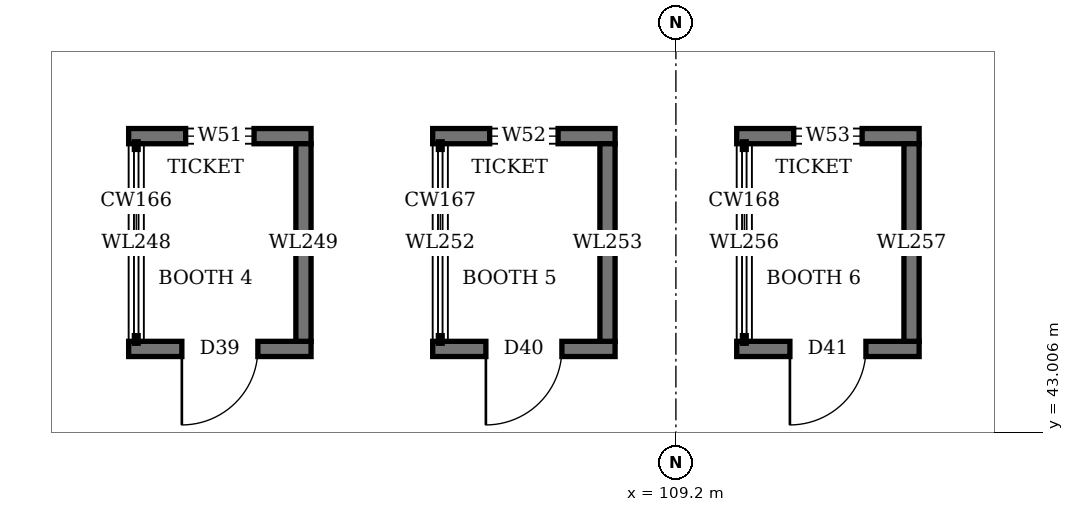
"""IFC4 building model, lengths in metres.
Left out: names, types, materials, properties, quantities, classifications, styles, units other than length and angle.
Written with IfcOpenShell. Run it as: python <this file> out.ifc"""

import sys

from ifc_helpers import new_model, si_unit, direction, frame, frame_2d, origin, place, context, subcontext, project, spatial, rectangle, extrude, element, fill, save


model = new_model("IFC4")
c1 = context("Model", 3, precision=1e-05, world=origin(), true_north=direction((0.0, 1.0)))
c2 = subcontext(c1, "Body", "Model", "MODEL_VIEW")
j1 = project(units=[si_unit("LENGTHUNIT", "METRE"), si_unit("PLANEANGLEUNIT", "RADIAN")], contexts=[c1])
p1 = place(None, origin())
s1 = spatial("IfcSite", under=j1, at=p1, CompositionType="ELEMENT")
p2 = place(p1, origin())
s2 = spatial("IfcBuilding", under=s1, at=p2, CompositionType="ELEMENT")
p3 = place(p2, origin())
s3 = spatial("IfcBuildingStorey", under=s2, at=p3, CompositionType="ELEMENT", Elevation=0.0)
p4 = place(p3, frame((102.0, 44.1, 0.0), z_axis=(0.0, 0.0, 1.0), x_axis=(1.0, 0.0, 0.0)))
e1 = element("IfcWall", 1, at=p4, inside=s3, PredefinedType="SOLIDWALL", context=c2, shape_type="SweptSolid", body=[
    extrude(rectangle(XDim=2.4, YDim=0.2, at=frame_2d((1.2, 0.0))), origin(), (0.0, 0.0, 1.0), 2.65),
])
p5 = place(p4, frame((0.7, 0.0, 0.0)))
e2 = element("IfcOpeningElement", 2, at=p5, cuts=e1, PredefinedType="OPENING", context=c2, shape_type="SweptSolid", body=[
    extrude(rectangle(XDim=1.0, YDim=2.1, at=frame_2d((0.5, 1.05))), frame((0.0, 0.11, 0.0), z_axis=(0.0, -1.0, 0.0), x_axis=(1.0, 0.0, 0.0)), (0.0, 0.0, 1.0), 0.22),
])
p6 = place(p3, frame((102.0, 46.9, 0.0), z_axis=(0.0, 0.0, 1.0), x_axis=(1.0, 0.0, 0.0)))
e3 = element("IfcWall", 3, at=p6, inside=s3, PredefinedType="SOLIDWALL", context=c2, shape_type="SweptSolid", body=[
    extrude(rectangle(XDim=2.4, YDim=0.2, at=frame_2d((1.2, 0.0))), origin(), (0.0, 0.0, 1.0), 2.65),
])
p7 = place(p6, frame((0.75, 0.0, 0.9)))
e4 = element("IfcOpeningElement", 4, at=p7, cuts=e3, PredefinedType="OPENING", context=c2, shape_type="SweptSolid", body=[
    extrude(rectangle(XDim=0.9, YDim=1.2, at=frame_2d((0.45, 0.6))), frame((0.0, 0.11, 0.0), z_axis=(0.0, -1.0, 0.0), x_axis=(1.0, 0.0, 0.0)), (0.0, 0.0, 1.0), 0.22),
])
p8 = place(p3, frame((102.1, 44.2, 0.0), z_axis=(0.0, 0.0, 1.0), x_axis=(0.0, 1.0, 0.0)))
e5 = element("IfcWall", 5, at=p8, inside=s3, PredefinedType="SOLIDWALL", context=c2, shape_type="SweptSolid", body=[
    extrude(rectangle(XDim=2.6, YDim=0.2, at=frame_2d((1.3, 0.0))), origin(), (0.0, 0.0, 1.0), 1.0),
])
p9 = place(p3, frame((104.3, 44.2, 0.0), z_axis=(0.0, 0.0, 1.0), x_axis=(0.0, 1.0, 0.0)))
e6 = element("IfcWall", 6, at=p9, inside=s3, PredefinedType="SOLIDWALL", context=c2, shape_type="SweptSolid", body=[
    extrude(rectangle(XDim=2.6, YDim=0.2, at=frame_2d((1.3, 0.0))), origin(), (0.0, 0.0, 1.0), 2.65),
])
p10 = place(p3, frame((106.0, 44.1, 0.0), z_axis=(0.0, 0.0, 1.0), x_axis=(1.0, 0.0, 0.0)))
e7 = element("IfcWall", 7, at=p10, inside=s3, PredefinedType="SOLIDWALL", context=c2, shape_type="SweptSolid", body=[
    extrude(rectangle(XDim=2.4, YDim=0.2, at=frame_2d((1.2, 0.0))), origin(), (0.0, 0.0, 1.0), 2.65),
])
p11 = place(p10, frame((0.7, 0.0, 0.0)))
e8 = element("IfcOpeningElement", 8, at=p11, cuts=e7, PredefinedType="OPENING", context=c2, shape_type="SweptSolid", body=[
    extrude(rectangle(XDim=1.0, YDim=2.1, at=frame_2d((0.5, 1.05))), frame((0.0, 0.11, 0.0), z_axis=(0.0, -1.0, 0.0), x_axis=(1.0, 0.0, 0.0)), (0.0, 0.0, 1.0), 0.22),
])
p12 = place(p3, frame((106.0, 46.9, 0.0), z_axis=(0.0, 0.0, 1.0), x_axis=(1.0, 0.0, 0.0)))
e9 = element("IfcWall", 9, at=p12, inside=s3, PredefinedType="SOLIDWALL", context=c2, shape_type="SweptSolid", body=[
    extrude(rectangle(XDim=2.4, YDim=0.2, at=frame_2d((1.2, 0.0))), origin(), (0.0, 0.0, 1.0), 2.65),
])
p13 = place(p12, frame((0.75, 0.0, 0.9)))
e10 = element("IfcOpeningElement", 10, at=p13, cuts=e9, PredefinedType="OPENING", context=c2, shape_type="SweptSolid", body=[
    extrude(rectangle(XDim=0.9, YDim=1.2, at=frame_2d((0.45, 0.6))), frame((0.0, 0.11, 0.0), z_axis=(0.0, -1.0, 0.0), x_axis=(1.0, 0.0, 0.0)), (0.0, 0.0, 1.0), 0.22),
])
p14 = place(p3, frame((106.1, 44.2, 0.0), z_axis=(0.0, 0.0, 1.0), x_axis=(0.0, 1.0, 0.0)))
e11 = element("IfcWall", 11, at=p14, inside=s3, PredefinedType="SOLIDWALL", context=c2, shape_type="SweptSolid", body=[
    extrude(rectangle(XDim=2.6, YDim=0.2, at=frame_2d((1.3, 0.0))), origin(), (0.0, 0.0, 1.0), 1.0),
])
p15 = place(p3, frame((108.3, 44.2, 0.0), z_axis=(0.0, 0.0, 1.0), x_axis=(0.0, 1.0, 0.0)))
e12 = element("IfcWall", 12, at=p15, inside=s3, PredefinedType="SOLIDWALL", context=c2, shape_type="SweptSolid", body=[
    extrude(rectangle(XDim=2.6, YDim=0.2, at=frame_2d((1.3, 0.0))), origin(), (0.0, 0.0, 1.0), 2.65),
])
p16 = place(p3, frame((110.0, 44.1, 0.0), z_axis=(0.0, 0.0, 1.0), x_axis=(1.0, 0.0, 0.0)))
e13 = element("IfcWall", 13, at=p16, inside=s3, PredefinedType="SOLIDWALL", context=c2, shape_type="SweptSolid", body=[
    extrude(rectangle(XDim=2.4, YDim=0.2, at=frame_2d((1.2, 0.0))), origin(), (0.0, 0.0, 1.0), 2.65),
])
p17 = place(p16, frame((0.7, 0.0, 0.0)))
e14 = element("IfcOpeningElement", 14, at=p17, cuts=e13, PredefinedType="OPENING", context=c2, shape_type="SweptSolid", body=[
    extrude(rectangle(XDim=1.0, YDim=2.1, at=frame_2d((0.5, 1.05))), frame((0.0, 0.11, 0.0), z_axis=(0.0, -1.0, 0.0), x_axis=(1.0, 0.0, 0.0)), (0.0, 0.0, 1.0), 0.22),
])
p18 = place(p3, frame((110.0, 46.9, 0.0), z_axis=(0.0, 0.0, 1.0), x_axis=(1.0, 0.0, 0.0)))
e15 = element("IfcWall", 15, at=p18, inside=s3, PredefinedType="SOLIDWALL", context=c2, shape_type="SweptSolid", body=[
    extrude(rectangle(XDim=2.4, YDim=0.2, at=frame_2d((1.2, 0.0))), origin(), (0.0, 0.0, 1.0), 2.65),
])
p19 = place(p18, frame((0.75, 0.0, 0.9)))
e16 = element("IfcOpeningElement", 16, at=p19, cuts=e15, PredefinedType="OPENING", context=c2, shape_type="SweptSolid", body=[
    extrude(rectangle(XDim=0.9, YDim=1.2, at=frame_2d((0.45, 0.6))), frame((0.0, 0.11, 0.0), z_axis=(0.0, -1.0, 0.0), x_axis=(1.0, 0.0, 0.0)), (0.0, 0.0, 1.0), 0.22),
])
p20 = place(p3, frame((110.1, 44.2, 0.0), z_axis=(0.0, 0.0, 1.0), x_axis=(0.0, 1.0, 0.0)))
e17 = element("IfcWall", 17, at=p20, inside=s3, PredefinedType="SOLIDWALL", context=c2, shape_type="SweptSolid", body=[
    extrude(rectangle(XDim=2.6, YDim=0.2, at=frame_2d((1.3, 0.0))), origin(), (0.0, 0.0, 1.0), 1.0),
])
p21 = place(p3, frame((112.3, 44.2, 0.0), z_axis=(0.0, 0.0, 1.0), x_axis=(0.0, 1.0, 0.0)))
e18 = element("IfcWall", 18, at=p21, inside=s3, PredefinedType="SOLIDWALL", context=c2, shape_type="SweptSolid", body=[
    extrude(rectangle(XDim=2.6, YDim=0.2, at=frame_2d((1.3, 0.0))), origin(), (0.0, 0.0, 1.0), 2.65),
])
p22 = place(p5, frame((1.0, 0.0, 0.0), z_axis=(0.0, 0.0, 1.0), x_axis=(-1.0, 0.0, 0.0)))
e19 = element("IfcDoor", 19, at=p22, inside=s3, OperationType="SINGLE_SWING_RIGHT", PredefinedType="DOOR", context=c2, shape_type="SweptSolid", body=[
    extrude(rectangle(XDim=1.0, YDim=2.1, at=frame_2d((0.5, 1.05))), frame((0.0, 0.025, 0.0), z_axis=(0.0, -1.0, 0.0), x_axis=(1.0, 0.0, 0.0)), (0.0, 0.0, 1.0), 0.05),
])
fill(e2, e19)
p23 = place(p7, origin())
e20 = element("IfcWindow", 20, at=p23, inside=s3, PartitioningType="SINGLE_PANEL", PredefinedType="WINDOW", context=c2, shape_type="SweptSolid", body=[
    extrude(rectangle(XDim=0.9, YDim=1.2, at=frame_2d((0.45, 0.6))), frame((0.0, 0.03, 0.0), z_axis=(0.0, -1.0, 0.0), x_axis=(1.0, 0.0, 0.0)), (0.0, 0.0, 1.0), 0.06),
])
fill(e4, e20)
p24 = place(p11, frame((1.0, 0.0, 0.0), z_axis=(0.0, 0.0, 1.0), x_axis=(-1.0, 0.0, 0.0)))
e21 = element("IfcDoor", 21, at=p24, inside=s3, OperationType="SINGLE_SWING_RIGHT", PredefinedType="DOOR", context=c2, shape_type="SweptSolid", body=[
    extrude(rectangle(XDim=1.0, YDim=2.1, at=frame_2d((0.5, 1.05))), frame((0.0, 0.025, 0.0), z_axis=(0.0, -1.0, 0.0), x_axis=(1.0, 0.0, 0.0)), (0.0, 0.0, 1.0), 0.05),
])
fill(e8, e21)
p25 = place(p13, origin())
e22 = element("IfcWindow", 22, at=p25, inside=s3, PartitioningType="SINGLE_PANEL", PredefinedType="WINDOW", context=c2, shape_type="SweptSolid", body=[
    extrude(rectangle(XDim=0.9, YDim=1.2, at=frame_2d((0.45, 0.6))), frame((0.0, 0.03, 0.0), z_axis=(0.0, -1.0, 0.0), x_axis=(1.0, 0.0, 0.0)), (0.0, 0.0, 1.0), 0.06),
])
fill(e10, e22)
p26 = place(p17, frame((1.0, 0.0, 0.0), z_axis=(0.0, 0.0, 1.0), x_axis=(-1.0, 0.0, 0.0)))
e23 = element("IfcDoor", 23, at=p26, inside=s3, OperationType="SINGLE_SWING_RIGHT", PredefinedType="DOOR", context=c2, shape_type="SweptSolid", body=[
    extrude(rectangle(XDim=1.0, YDim=2.1, at=frame_2d((0.5, 1.05))), frame((0.0, 0.025, 0.0), z_axis=(0.0, -1.0, 0.0), x_axis=(1.0, 0.0, 0.0)), (0.0, 0.0, 1.0), 0.05),
])
fill(e14, e23)
p27 = place(p19, origin())
e24 = element("IfcWindow", 24, at=p27, inside=s3, PartitioningType="SINGLE_PANEL", PredefinedType="WINDOW", context=c2, shape_type="SweptSolid", body=[
    extrude(rectangle(XDim=0.9, YDim=1.2, at=frame_2d((0.45, 0.6))), frame((0.0, 0.03, 0.0), z_axis=(0.0, -1.0, 0.0), x_axis=(1.0, 0.0, 0.0)), (0.0, 0.0, 1.0), 0.06),
])
fill(e16, e24)
save(model, sys.argv[1])
